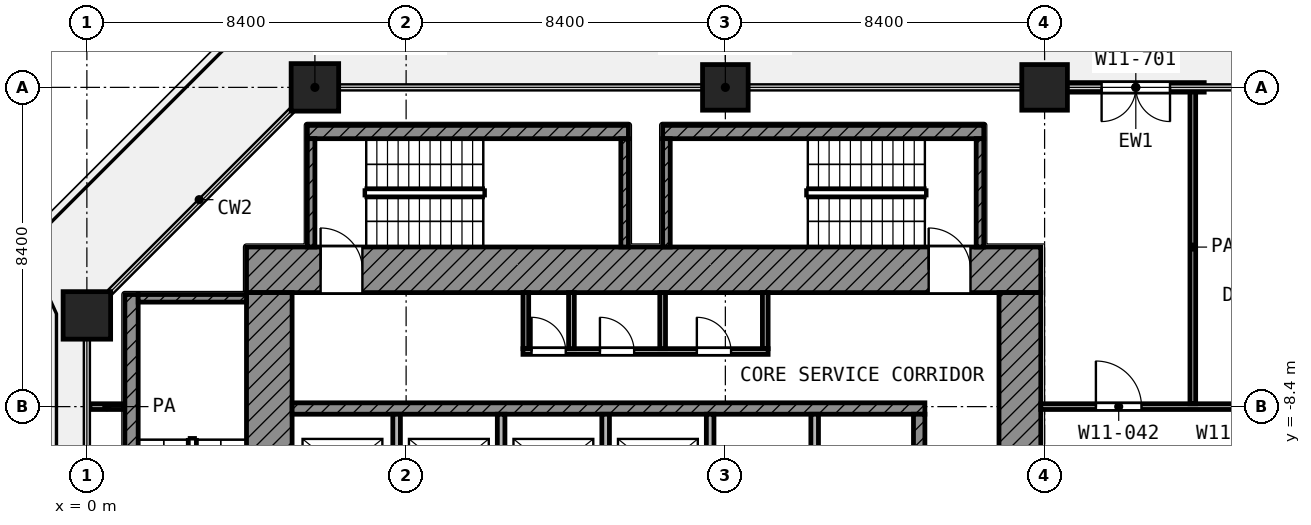
"""IFC4 building model, lengths in metres.
Left out: names, types, materials, properties, quantities, classifications, styles, units other than length and angle.
Written with IfcOpenShell. Run it as: python <this file> out.ifc"""

import sys

from ifc_helpers import new_model, si_unit, direction, frame, frame_2d, origin, origin_2d, place, context, subcontext, project, spatial, rectangle, extrude, element, fill, save


model = new_model("IFC4")
c1 = context("Model", 3, precision=1e-05, world=origin(), true_north=direction((0.0, 1.0)))
c2 = subcontext(c1, "Body", "Model", "MODEL_VIEW")
j1 = project(units=[si_unit("LENGTHUNIT", "METRE"), si_unit("PLANEANGLEUNIT", "RADIAN")], contexts=[c1])
p1 = place(None, origin())
s1 = spatial("IfcSite", under=j1, at=p1, CompositionType="ELEMENT")
p2 = place(p1, origin())
s2 = spatial("IfcBuilding", under=s1, at=p2, CompositionType="ELEMENT")
p3 = place(p2, frame((0.0, 0.0, 51.8)))
s3 = spatial("IfcBuildingStorey", under=s2, at=p3, CompositionType="ELEMENT", Elevation=51.8)
p4 = place(p3, frame((6.0, 0.0, 0.0), z_axis=(0.0, 0.0, 1.0), x_axis=(1.0, 0.0, 0.0)))
e1 = element("IfcColumn", 1, at=p4, inside=s3, PredefinedType="COLUMN", context=c2, shape_type="SweptSolid", body=[
    extrude(rectangle(XDim=1.25, YDim=1.25, at=origin_2d()), origin(), (0.0, 0.0, 1.0), 4.2),
])
for number, where, z_axis, x_axis in (
    (2, (16.8, 0.0, 0.0), (0.0, 0.0, 1.0), (1.0, 0.0, 0.0)),
    (3, (25.2, 0.0, 0.0), (0.0, 0.0, 1.0), (1.0, 0.0, 0.0)),
):
    element("IfcColumn", number, at=place(p3, frame(where, z_axis=z_axis, x_axis=x_axis)), inside=s3, PredefinedType="COLUMN", context=c2, shape_type="SweptSolid", body=[
        extrude(rectangle(XDim=1.2, YDim=1.2, at=origin_2d()), origin(), (0.0, 0.0, 1.0), 4.2),
    ])
p5 = place(p3, frame((0.0, -6.0, 0.0), z_axis=(0.0, 0.0, 1.0), x_axis=(1.0, 0.0, 0.0)))
e4 = element("IfcColumn", 4, at=p5, inside=s3, PredefinedType="COLUMN", context=c2, shape_type="SweptSolid", body=[
    extrude(rectangle(XDim=1.25, YDim=1.25, at=origin_2d()), origin(), (0.0, 0.0, 1.0), 4.2),
])
p6 = place(p3, frame((29.4, 0.0, 0.0), z_axis=(0.0, 0.0, 1.0), x_axis=(-1.0, 0.0, 0.0)))
e5 = element("IfcWall", 5, at=p6, inside=s3, PredefinedType="SOLIDWALL", context=c2, shape_type="SweptSolid", body=[
    extrude(rectangle(XDim=3.6, YDim=0.25, at=frame_2d((1.8, 0.0))), origin(), (0.0, 0.0, 1.0), 3.78),
])
p7 = place(p6, frame((0.9, 0.0, 0.0)))
e6 = element("IfcOpeningElement", 6, at=p7, cuts=e5, PredefinedType="OPENING", context=c2, shape_type="SweptSolid", body=[
    extrude(rectangle(XDim=1.8, YDim=2.1, at=frame_2d((0.9, 1.05))), frame((0.0, 0.135, 0.0), z_axis=(0.0, -1.0, 0.0), x_axis=(1.0, 0.0, 0.0)), (0.0, 0.0, 1.0), 0.27),
])
p8 = place(p3, frame((4.2, -4.8, 0.0), z_axis=(0.0, 0.0, 1.0), x_axis=(1.0, 0.0, 0.0)))
e7 = element("IfcWall", 7, at=p8, inside=s3, PredefinedType="SHEAR", context=c2, shape_type="SweptSolid", body=[
    extrude(rectangle(XDim=20.9, YDim=1.2, at=frame_2d((10.45, 0.0))), origin(), (0.0, 0.0, 1.0), 3.9),
])
p9 = place(p8, frame((1.95, 0.0, 0.0)))
e8 = element("IfcOpeningElement", 8, at=p9, cuts=e7, PredefinedType="OPENING", context=c2, shape_type="SweptSolid", body=[
    extrude(rectangle(XDim=1.1, YDim=2.1, at=frame_2d((0.55, 1.05))), frame((0.0, 0.61, 0.0), z_axis=(0.0, -1.0, 0.0), x_axis=(1.0, 0.0, 0.0)), (0.0, 0.0, 1.0), 1.22),
])
p10 = place(p8, frame((17.95, 0.0, 0.0)))
e9 = element("IfcOpeningElement", 9, at=p10, cuts=e7, PredefinedType="OPENING", context=c2, shape_type="SweptSolid", body=[
    extrude(rectangle(XDim=1.1, YDim=2.1, at=frame_2d((0.55, 1.05))), frame((0.0, 0.61, 0.0), z_axis=(0.0, -1.0, 0.0), x_axis=(1.0, 0.0, 0.0)), (0.0, 0.0, 1.0), 1.22),
])
p11 = place(p3, frame((4.8, -25.1, 0.0), z_axis=(0.0, 0.0, 1.0), x_axis=(0.0, 1.0, 0.0)))
e10 = element("IfcWall", 10, at=p11, inside=s3, PredefinedType="SHEAR", context=c2, shape_type="SweptSolid", body=[
    extrude(rectangle(XDim=19.7, YDim=1.2, at=frame_2d((9.85, 0.0))), origin(), (0.0, 0.0, 1.0), 3.9),
])
p12 = place(p11, frame((11.55, 0.0, 0.0)))
e11 = element("IfcOpeningElement", 11, at=p12, cuts=e10, PredefinedType="OPENING", context=c2, shape_type="SweptSolid", body=[
    extrude(rectangle(XDim=1.1, YDim=2.1, at=frame_2d((0.55, 1.05))), frame((0.0, 0.61, 0.0), z_axis=(0.0, -1.0, 0.0), x_axis=(1.0, 0.0, 0.0)), (0.0, 0.0, 1.0), 1.22),
])
p13 = place(p11, frame((2.25, 0.0, 0.0)))
e12 = element("IfcOpeningElement", 12, at=p13, cuts=e10, PredefinedType="OPENING", context=c2, shape_type="SweptSolid", body=[
    extrude(rectangle(XDim=1.1, YDim=2.1, at=frame_2d((0.55, 1.05))), frame((0.0, 0.61, 0.0), z_axis=(0.0, -1.0, 0.0), x_axis=(1.0, 0.0, 0.0)), (0.0, 0.0, 1.0), 1.22),
])
p14 = place(p3, frame((24.55, -24.0, 0.0), z_axis=(0.0, 0.0, 1.0), x_axis=(0.0, 1.0, 0.0)))
e13 = element("IfcWall", 13, at=p14, inside=s3, PredefinedType="SHEAR", context=c2, shape_type="SweptSolid", body=[
    extrude(rectangle(XDim=18.6, YDim=1.1, at=frame_2d((9.3, 0.0))), origin(), (0.0, 0.0, 1.0), 3.9),
])
p15 = place(p14, frame((10.5, 0.0, 0.0)))
e14 = element("IfcOpeningElement", 14, at=p15, cuts=e13, PredefinedType="OPENING", context=c2, shape_type="SweptSolid", body=[
    extrude(rectangle(XDim=1.8, YDim=2.1, at=frame_2d((0.9, 1.05))), frame((0.0, 0.56, 0.0), z_axis=(0.0, -1.0, 0.0), x_axis=(1.0, 0.0, 0.0)), (0.0, 0.0, 1.0), 1.12),
])
p16 = place(p3, frame((5.4, -8.45, 0.0), z_axis=(0.0, 0.0, 1.0), x_axis=(1.0, 0.0, 0.0)))
e15 = element("IfcWall", 15, at=p16, inside=s3, PredefinedType="SHEAR", context=c2, shape_type="SweptSolid", body=[
    extrude(rectangle(XDim=16.65, YDim=0.3, at=frame_2d((8.325, 0.0))), origin(), (0.0, 0.0, 1.0), 3.9),
])
p17 = place(p3, frame((21.9, -10.95, 0.0), z_axis=(0.0, 0.0, 1.0), x_axis=(0.0, 1.0, 0.0)))
e16 = element("IfcWall", 16, at=p17, inside=s3, PredefinedType="SHEAR", context=c2, shape_type="SweptSolid", body=[
    extrude(rectangle(XDim=2.35, YDim=0.3, at=frame_2d((1.175, 0.0))), origin(), (0.0, 0.0, 1.0), 3.9),
])
for number, where, z_axis, x_axis in (
    (17, (8.15, -10.95, 0.0), (0.0, 0.0, 1.0), (0.0, 1.0, 0.0)),
    (18, (10.9, -10.95, 0.0), (0.0, 0.0, 1.0), (0.0, 1.0, 0.0)),
    (19, (13.65, -10.95, 0.0), (0.0, 0.0, 1.0), (0.0, 1.0, 0.0)),
    (20, (16.4, -10.95, 0.0), (0.0, 0.0, 1.0), (0.0, 1.0, 0.0)),
    (21, (19.15, -10.95, 0.0), (0.0, 0.0, 1.0), (0.0, 1.0, 0.0)),
):
    element("IfcWall", number, at=place(p3, frame(where, z_axis=z_axis, x_axis=x_axis)), inside=s3, PredefinedType="PARTITIONING", context=c2, shape_type="SweptSolid", body=[
        extrude(rectangle(XDim=2.35, YDim=0.2, at=frame_2d((1.175, 0.0))), origin(), (0.0, 0.0, 1.0), 3.9),
    ])
p18 = place(p3, frame((11.475, -6.95, 0.0), z_axis=(0.0, 0.0, 1.0), x_axis=(1.0, 0.0, 0.0)))
e22 = element("IfcWall", 22, at=p18, inside=s3, PredefinedType="PARTITIONING", context=c2, shape_type="SweptSolid", body=[
    extrude(rectangle(XDim=6.45, YDim=0.15, at=frame_2d((3.225, 0.0))), origin(), (0.0, 0.0, 1.0), 3.9),
])
p19 = place(p18, frame((0.225, 0.0, 0.0)))
e23 = element("IfcOpeningElement", 23, at=p19, cuts=e22, PredefinedType="OPENING", context=c2, shape_type="SweptSolid", body=[
    extrude(rectangle(XDim=0.9, YDim=2.1, at=frame_2d((0.45, 1.05))), frame((0.0, 0.085, 0.0), z_axis=(0.0, -1.0, 0.0), x_axis=(1.0, 0.0, 0.0)), (0.0, 0.0, 1.0), 0.17),
])
p20 = place(p18, frame((2.025, 0.0, 0.0)))
e24 = element("IfcOpeningElement", 24, at=p20, cuts=e22, PredefinedType="OPENING", context=c2, shape_type="SweptSolid", body=[
    extrude(rectangle(XDim=0.9, YDim=2.1, at=frame_2d((0.45, 1.05))), frame((0.0, 0.085, 0.0), z_axis=(0.0, -1.0, 0.0), x_axis=(1.0, 0.0, 0.0)), (0.0, 0.0, 1.0), 0.17),
])
p21 = place(p18, frame((4.575, 0.0, 0.0)))
e25 = element("IfcOpeningElement", 25, at=p21, cuts=e22, PredefinedType="OPENING", context=c2, shape_type="SweptSolid", body=[
    extrude(rectangle(XDim=0.9, YDim=2.1, at=frame_2d((0.45, 1.05))), frame((0.0, 0.085, 0.0), z_axis=(0.0, -1.0, 0.0), x_axis=(1.0, 0.0, 0.0)), (0.0, 0.0, 1.0), 0.17),
])
for number, where, z_axis, x_axis in (
    (26, (11.55, -6.875, 0.0), (0.0, 0.0, 1.0), (0.0, 1.0, 0.0)),
    (27, (12.75, -6.875, 0.0), (0.0, 0.0, 1.0), (0.0, 1.0, 0.0)),
    (28, (15.15, -6.875, 0.0), (0.0, 0.0, 1.0), (0.0, 1.0, 0.0)),
    (29, (17.85, -6.875, 0.0), (0.0, 0.0, 1.0), (0.0, 1.0, 0.0)),
):
    element("IfcWall", number, at=place(p3, frame(where, z_axis=z_axis, x_axis=x_axis)), inside=s3, PredefinedType="PARTITIONING", context=c2, shape_type="SweptSolid", body=[
        extrude(rectangle(XDim=1.475, YDim=0.15, at=frame_2d((0.738, 0.0))), origin(), (0.0, 0.0, 1.0), 3.9),
    ])
p22 = place(p3, frame((1.175, -13.9, 0.0), z_axis=(0.0, 0.0, 1.0), x_axis=(0.0, 1.0, 0.0)))
e30 = element("IfcWall", 30, at=p22, inside=s3, PredefinedType="SHEAR", context=c2, shape_type="SweptSolid", body=[
    extrude(rectangle(XDim=8.45, YDim=0.35, at=frame_2d((4.225, 0.0))), origin(), (0.0, 0.0, 1.0), 3.9),
])
p23 = place(p3, frame((1.35, -5.55, 0.0), z_axis=(0.0, 0.0, 1.0), x_axis=(1.0, 0.0, 0.0)))
e31 = element("IfcWall", 31, at=p23, inside=s3, PredefinedType="SHEAR", context=c2, shape_type="SweptSolid", body=[
    extrude(rectangle(XDim=2.85, YDim=0.2, at=frame_2d((1.425, 0.0))), origin(), (0.0, 0.0, 1.0), 3.9),
])
p24 = place(p3, frame((5.8, -1.175, 0.0), z_axis=(0.0, 0.0, 1.0), x_axis=(1.0, 0.0, 0.0)))
e32 = element("IfcWall", 32, at=p24, inside=s3, PredefinedType="SHEAR", context=c2, shape_type="SweptSolid", body=[
    extrude(rectangle(XDim=8.45, YDim=0.35, at=frame_2d((4.225, 0.0))), origin(), (0.0, 0.0, 1.0), 3.9),
])
for number, where, z_axis, x_axis in (
    (33, (5.9, -4.2, 0.0), (0.0, 0.0, 1.0), (0.0, 1.0, 0.0)),
    (34, (14.15, -4.2, 0.0), (0.0, 0.0, 1.0), (0.0, 1.0, 0.0)),
):
    element("IfcWall", number, at=place(p3, frame(where, z_axis=z_axis, x_axis=x_axis)), inside=s3, PredefinedType="SHEAR", context=c2, shape_type="SweptSolid", body=[
        extrude(rectangle(XDim=2.85, YDim=0.2, at=frame_2d((1.425, 0.0))), origin(), (0.0, 0.0, 1.0), 3.9),
    ])
p25 = place(p3, frame((15.15, -1.175, 0.0), z_axis=(0.0, 0.0, 1.0), x_axis=(1.0, 0.0, 0.0)))
e35 = element("IfcWall", 35, at=p25, inside=s3, PredefinedType="SHEAR", context=c2, shape_type="SweptSolid", body=[
    extrude(rectangle(XDim=8.45, YDim=0.35, at=frame_2d((4.225, 0.0))), origin(), (0.0, 0.0, 1.0), 3.9),
])
for number, where, z_axis, x_axis in (
    (36, (15.25, -4.2, 0.0), (0.0, 0.0, 1.0), (0.0, 1.0, 0.0)),
    (37, (23.5, -4.2, 0.0), (0.0, 0.0, 1.0), (0.0, 1.0, 0.0)),
):
    element("IfcWall", number, at=place(p3, frame(where, z_axis=z_axis, x_axis=x_axis)), inside=s3, PredefinedType="SHEAR", context=c2, shape_type="SweptSolid", body=[
        extrude(rectangle(XDim=2.85, YDim=0.2, at=frame_2d((1.425, 0.0))), origin(), (0.0, 0.0, 1.0), 3.9),
    ])
p26 = place(p3, frame((0.08, -8.4, 0.0), z_axis=(0.0, 0.0, 1.0), x_axis=(1.0, 0.0, 0.0)))
e38 = element("IfcWall", 38, at=p26, inside=s3, PredefinedType="PARTITIONING", context=c2, shape_type="SweptSolid", body=[
    extrude(rectangle(XDim=0.89, YDim=0.15, at=frame_2d((0.445, 0.0))), origin(), (0.0, 0.0, 1.0), 3.9),
])
p27 = place(p3, frame((25.1, -8.4, 0.0), z_axis=(0.0, 0.0, 1.0), x_axis=(1.0, 0.0, 0.0)))
e39 = element("IfcWall", 39, at=p27, inside=s3, PredefinedType="PARTITIONING", context=c2, shape_type="SweptSolid", body=[
    extrude(rectangle(XDim=14.932, YDim=0.15, at=frame_2d((7.466, 0.0))), origin(), (0.0, 0.0, 1.0), 3.9),
])
p28 = place(p27, frame((1.45, 0.0, 0.0)))
e40 = element("IfcOpeningElement", 40, at=p28, cuts=e39, PredefinedType="OPENING", context=c2, shape_type="SweptSolid", body=[
    extrude(rectangle(XDim=1.2, YDim=2.1, at=frame_2d((0.6, 1.05))), frame((0.0, 0.085, 0.0), z_axis=(0.0, -1.0, 0.0), x_axis=(1.0, 0.0, 0.0)), (0.0, 0.0, 1.0), 0.17),
])
p29 = place(p27, frame((5.75, 0.0, 0.0)))
e41 = element("IfcOpeningElement", 41, at=p29, cuts=e39, PredefinedType="OPENING", context=c2, shape_type="SweptSolid", body=[
    extrude(rectangle(XDim=1.0, YDim=2.1, at=frame_2d((0.5, 1.05))), frame((0.0, 0.085, 0.0), z_axis=(0.0, -1.0, 0.0), x_axis=(1.0, 0.0, 0.0)), (0.0, 0.0, 1.0), 0.17),
])
p30 = place(p27, frame((9.2, 0.0, 0.0)))
e42 = element("IfcOpeningElement", 42, at=p30, cuts=e39, PredefinedType="OPENING", context=c2, shape_type="SweptSolid", body=[
    extrude(rectangle(XDim=1.2, YDim=2.1, at=frame_2d((0.6, 1.05))), frame((0.0, 0.085, 0.0), z_axis=(0.0, -1.0, 0.0), x_axis=(1.0, 0.0, 0.0)), (0.0, 0.0, 1.0), 0.17),
])
p31 = place(p3, frame((29.1, -8.325, 0.0), z_axis=(0.0, 0.0, 1.0), x_axis=(0.0, 1.0, 0.0)))
e43 = element("IfcWall", 43, at=p31, inside=s3, PredefinedType="PARTITIONING", context=c2, shape_type="SweptSolid", body=[
    extrude(rectangle(XDim=8.245, YDim=0.15, at=frame_2d((4.123, 0.0))), origin(), (0.0, 0.0, 1.0), 3.9),
])
p32 = place(p7, origin())
e44 = element("IfcDoor", 44, at=p32, inside=s3, OperationType="DOUBLE_DOOR_SINGLE_SWING", PredefinedType="DOOR", context=c2, shape_type="SweptSolid", body=[
    extrude(rectangle(XDim=1.8, YDim=2.1, at=frame_2d((0.9, 1.05))), frame((0.0, 0.025, 0.0), z_axis=(0.0, -1.0, 0.0), x_axis=(1.0, 0.0, 0.0)), (0.0, 0.0, 1.0), 0.05),
])
fill(e6, e44)
p33 = place(p9, origin())
e45 = element("IfcDoor", 45, at=p33, inside=s3, OperationType="SINGLE_SWING_LEFT", PredefinedType="DOOR", context=c2, shape_type="SweptSolid", body=[
    extrude(rectangle(XDim=1.1, YDim=2.1, at=frame_2d((0.55, 1.05))), frame((0.0, 0.025, 0.0), z_axis=(0.0, -1.0, 0.0), x_axis=(1.0, 0.0, 0.0)), (0.0, 0.0, 1.0), 0.05),
])
fill(e8, e45)
p34 = place(p10, origin())
e46 = element("IfcDoor", 46, at=p34, inside=s3, OperationType="SINGLE_SWING_LEFT", PredefinedType="DOOR", context=c2, shape_type="SweptSolid", body=[
    extrude(rectangle(XDim=1.1, YDim=2.1, at=frame_2d((0.55, 1.05))), frame((0.0, 0.025, 0.0), z_axis=(0.0, -1.0, 0.0), x_axis=(1.0, 0.0, 0.0)), (0.0, 0.0, 1.0), 0.05),
])
fill(e9, e46)
p35 = place(p19, origin())
e47 = element("IfcDoor", 47, at=p35, inside=s3, OperationType="SINGLE_SWING_LEFT", PredefinedType="DOOR", context=c2, shape_type="SweptSolid", body=[
    extrude(rectangle(XDim=0.9, YDim=2.1, at=frame_2d((0.45, 1.05))), frame((0.0, 0.025, 0.0), z_axis=(0.0, -1.0, 0.0), x_axis=(1.0, 0.0, 0.0)), (0.0, 0.0, 1.0), 0.05),
])
fill(e23, e47)
p36 = place(p20, origin())
e48 = element("IfcDoor", 48, at=p36, inside=s3, OperationType="SINGLE_SWING_LEFT", PredefinedType="DOOR", context=c2, shape_type="SweptSolid", body=[
    extrude(rectangle(XDim=0.9, YDim=2.1, at=frame_2d((0.45, 1.05))), frame((0.0, 0.025, 0.0), z_axis=(0.0, -1.0, 0.0), x_axis=(1.0, 0.0, 0.0)), (0.0, 0.0, 1.0), 0.05),
])
fill(e24, e48)
p37 = place(p21, origin())
e49 = element("IfcDoor", 49, at=p37, inside=s3, OperationType="SINGLE_SWING_LEFT", PredefinedType="DOOR", context=c2, shape_type="SweptSolid", body=[
    extrude(rectangle(XDim=0.9, YDim=2.1, at=frame_2d((0.45, 1.05))), frame((0.0, 0.025, 0.0), z_axis=(0.0, -1.0, 0.0), x_axis=(1.0, 0.0, 0.0)), (0.0, 0.0, 1.0), 0.05),
])
fill(e25, e49)
p38 = place(p28, origin())
e50 = element("IfcDoor", 50, at=p38, inside=s3, OperationType="SINGLE_SWING_LEFT", PredefinedType="DOOR", context=c2, shape_type="SweptSolid", body=[
    extrude(rectangle(XDim=1.2, YDim=2.1, at=frame_2d((0.6, 1.05))), frame((0.0, 0.025, 0.0), z_axis=(0.0, -1.0, 0.0), x_axis=(1.0, 0.0, 0.0)), (0.0, 0.0, 1.0), 0.05),
])
fill(e40, e50)
save(model, sys.argv[1])
